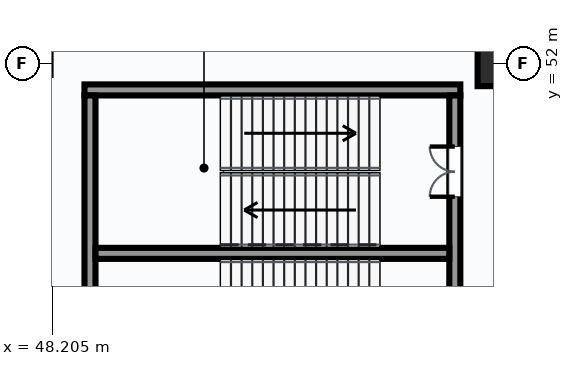
"""IFC4 building model, lengths in metres.
Left out: names, types, materials, properties, quantities, classifications, styles, units other than length and angle.
Written with IfcOpenShell. Run it as: python <this file> out.ifc"""

import sys

from ifc_helpers import new_model, si_unit, direction, frame, frame_2d, origin, origin_2d, place, context, subcontext, project, spatial, rectangle, extrude, element, fill, save


model = new_model("IFC4")
c1 = context("Model", 3, precision=1e-05, world=origin(), true_north=direction((0.0, 1.0)))
c2 = subcontext(c1, "Body", "Model", "MODEL_VIEW")
j1 = project(units=[si_unit("LENGTHUNIT", "METRE"), si_unit("PLANEANGLEUNIT", "RADIAN")], contexts=[c1])
p1 = place(None, origin())
s1 = spatial("IfcSite", under=j1, at=p1, CompositionType="ELEMENT")
p2 = place(p1, origin())
s2 = spatial("IfcBuilding", under=s1, at=p2, CompositionType="ELEMENT")
p3 = place(p2, origin())
s3 = spatial("IfcBuildingStorey", under=s2, at=p3, CompositionType="ELEMENT", Elevation=0.0)
p4 = place(p3, frame((60.0, 52.0, 0.0), z_axis=(0.0, 0.0, 1.0), x_axis=(1.0, 0.0, 0.0)))
e1 = element("IfcColumn", 1, at=p4, inside=s3, PredefinedType="COLUMN", context=c2, shape_type="SweptSolid", body=[
    extrude(rectangle(XDim=1.2, YDim=1.2, at=origin_2d()), origin(), (0.0, 0.0, 1.0), 5.4),
])
p5 = place(p3, frame((49.055, 51.3, 0.0), z_axis=(0.0, 0.0, 1.0), x_axis=(1.0, 0.0, 0.0)))
e2 = element("IfcWall", 2, at=p5, inside=s3, PredefinedType="SHEAR", context=c2, shape_type="SweptSolid", body=[
    extrude(rectangle(XDim=9.89, YDim=0.29, at=frame_2d((4.945, 0.0))), origin(), (0.0, 0.0, 1.0), 5.4),
])
p6 = place(p3, frame((49.2, 42.845, 0.0), z_axis=(0.0, 0.0, 1.0), x_axis=(0.0, 1.0, 0.0)))
e3 = element("IfcWall", 3, at=p6, inside=s3, PredefinedType="SHEAR", context=c2, shape_type="SweptSolid", body=[
    extrude(rectangle(XDim=8.31, YDim=0.29, at=frame_2d((4.155, 0.0))), origin(), (0.0, 0.0, 1.0), 5.4),
])
p7 = place(p3, frame((58.8, 42.845, 0.0), z_axis=(0.0, 0.0, 1.0), x_axis=(0.0, 1.0, 0.0)))
e4 = element("IfcWall", 4, at=p7, inside=s3, PredefinedType="SHEAR", context=c2, shape_type="SweptSolid", body=[
    extrude(rectangle(XDim=8.31, YDim=0.29, at=frame_2d((4.155, 0.0))), origin(), (0.0, 0.0, 1.0), 5.4),
])
p8 = place(p7, frame((1.305, 0.0, 0.0)))
e5 = element("IfcOpeningElement", 5, at=p8, cuts=e4, PredefinedType="OPENING", context=c2, shape_type="SweptSolid", body=[
    extrude(rectangle(XDim=1.4, YDim=2.2, at=frame_2d((0.7, 1.1))), frame((0.0, 0.155, 0.0), z_axis=(0.0, -1.0, 0.0), x_axis=(1.0, 0.0, 0.0)), (0.0, 0.0, 1.0), 0.31),
])
p9 = place(p7, frame((5.645, 0.0, 0.0)))
e6 = element("IfcOpeningElement", 6, at=p9, cuts=e4, PredefinedType="OPENING", context=c2, shape_type="SweptSolid", body=[
    extrude(rectangle(XDim=1.32, YDim=2.2, at=frame_2d((0.66, 1.1))), frame((0.0, 0.155, 0.0), z_axis=(0.0, -1.0, 0.0), x_axis=(1.0, 0.0, 0.0)), (0.0, 0.0, 1.0), 0.31),
])
p10 = place(p3, frame((49.345, 47.0, 0.0), z_axis=(0.0, 0.0, 1.0), x_axis=(1.0, 0.0, 0.0)))
e7 = element("IfcWall", 7, at=p10, inside=s3, PredefinedType="SHEAR", context=c2, shape_type="SweptSolid", body=[
    extrude(rectangle(XDim=9.31, YDim=0.29, at=frame_2d((4.655, 0.0))), origin(), (0.0, 0.0, 1.0), 5.4),
])
p11 = place(p9, origin())
e8 = element("IfcDoor", 8, at=p11, inside=s3, OperationType="DOUBLE_DOOR_SINGLE_SWING", PredefinedType="DOOR", context=c2, shape_type="SweptSolid", body=[
    extrude(rectangle(XDim=1.32, YDim=2.2, at=frame_2d((0.66, 1.1))), frame((0.0, 0.025, 0.0), z_axis=(0.0, -1.0, 0.0), x_axis=(1.0, 0.0, 0.0)), (0.0, 0.0, 1.0), 0.05),
])
fill(e6, e8)
save(model, sys.argv[1])
